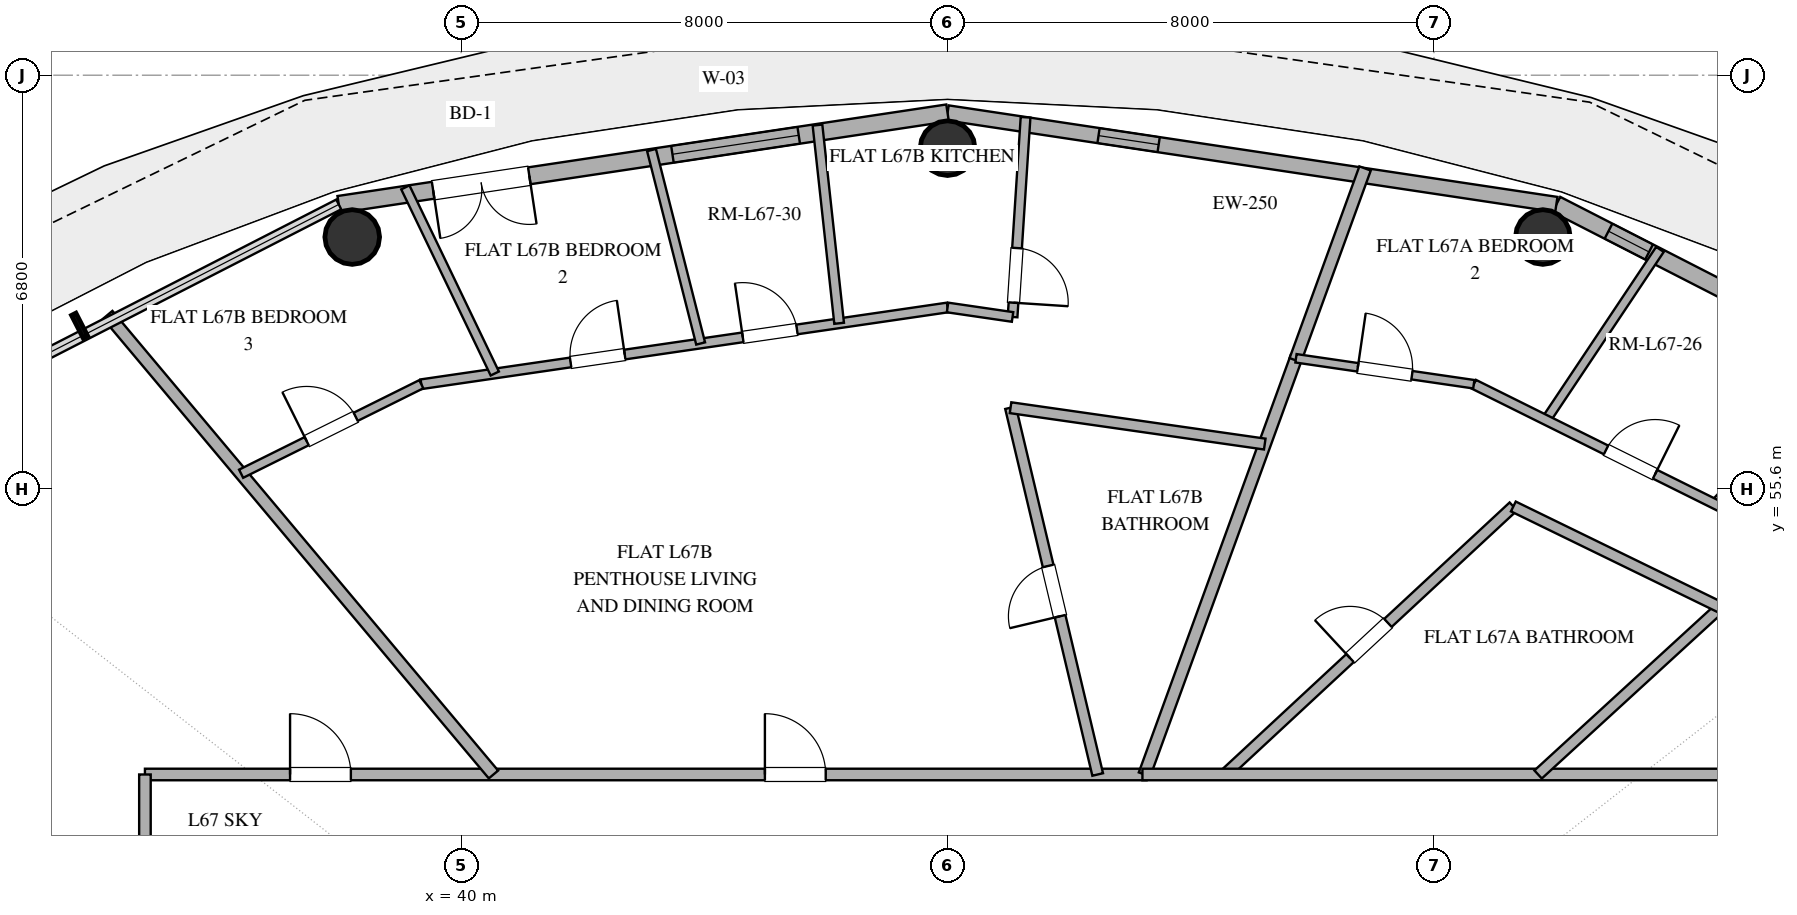
"""IFC4 building model, lengths in metres.
Left out: names, types, materials, properties, quantities, classifications, styles, units other than length and angle.
Written with IfcOpenShell. Run it as: python <this file> out.ifc"""

import sys

from ifc_helpers import new_model, si_unit, direction, frame, frame_2d, origin, origin_2d, place, context, subcontext, project, spatial, rectangle, hollow_circle, extrude, element, fill, save


model = new_model("IFC4")
c1 = context("Model", 3, precision=1e-05, world=origin(), true_north=direction((0.0, 1.0)))
c2 = subcontext(c1, "Body", "Model", "MODEL_VIEW")
j1 = project(units=[si_unit("LENGTHUNIT", "METRE"), si_unit("PLANEANGLEUNIT", "RADIAN")], contexts=[c1])
p1 = place(None, origin())
s1 = spatial("IfcSite", under=j1, at=p1, CompositionType="ELEMENT")
p2 = place(p1, origin())
s2 = spatial("IfcBuilding", under=s1, at=p2, CompositionType="ELEMENT")
p3 = place(p2, frame((0.0, 0.0, 262.2)))
s3 = spatial("IfcBuildingStorey", under=s2, at=p3, CompositionType="ELEMENT", Elevation=262.2)
for number, where, z_axis, x_axis in (
    (1, (57.791, 59.739, 0.0), (0.0, 0.0, 1.0), (1.0, 0.0, 0.0)),
    (2, (48.0, 61.2, 0.0), (0.0, 0.0, 1.0), (1.0, 0.0, 0.0)),
    (3, (38.209, 59.739, 0.0), (0.0, 0.0, 1.0), (1.0, 0.0, 0.0)),
):
    element("IfcColumn", number, at=place(p3, frame(where, z_axis=z_axis, x_axis=x_axis)), inside=s3, PredefinedType="COLUMN", context=c2, shape_type="SweptSolid", body=[
        extrude(hollow_circle(Radius=0.45, WallThickness=0.025, at=origin_2d()), origin(), (0.0, 0.0, 1.0), 3.37),
    ])
p4 = place(p3, frame((66.383, 55.987, 0.0), z_axis=(0.0, 0.0, 1.0), x_axis=(-0.890007394051, 0.455946091699, 0.0)))
e4 = element("IfcWall", 4, at=p4, inside=s3, PredefinedType="SOLIDWALL", context=c2, shape_type="SweptSolid", body=[
    extrude(rectangle(XDim=9.404, YDim=0.28, at=frame_2d((4.702, 0.0))), origin(), (0.0, 0.0, 1.0), 3.37),
])
p5 = place(p4, frame((1.996, 0.0, 0.85)))
e5 = element("IfcOpeningElement", 5, at=p5, cuts=e4, PredefinedType="OPENING", context=c2, shape_type="SweptSolid", body=[
    extrude(rectangle(XDim=1.2, YDim=1.8, at=frame_2d((0.6, 0.9))), frame((0.0, 0.15, 0.0), z_axis=(0.0, -1.0, 0.0), x_axis=(1.0, 0.0, 0.0)), (0.0, 0.0, 1.0), 0.3),
])
p6 = place(p4, frame((5.109, 0.0, 0.85)))
e6 = element("IfcOpeningElement", 6, at=p6, cuts=e4, PredefinedType="OPENING", context=c2, shape_type="SweptSolid", body=[
    extrude(rectangle(XDim=1.2, YDim=1.6, at=frame_2d((0.6, 0.8))), frame((0.0, 0.15, 0.0), z_axis=(0.0, -1.0, 0.0), x_axis=(1.0, 0.0, 0.0)), (0.0, 0.0, 1.0), 0.3),
])
p7 = place(p4, frame((7.691, 0.0, 0.85)))
e7 = element("IfcOpeningElement", 7, at=p7, cuts=e4, PredefinedType="OPENING", context=c2, shape_type="SweptSolid", body=[
    extrude(rectangle(XDim=0.75, YDim=1.8, at=frame_2d((0.375, 0.9))), frame((0.0, 0.15, 0.0), z_axis=(0.0, -1.0, 0.0), x_axis=(1.0, 0.0, 0.0)), (0.0, 0.0, 1.0), 0.3),
])
p8 = place(p3, frame((58.013, 60.274, 0.0), z_axis=(0.0, 0.0, 1.0), x_axis=(-0.988882522213, 0.148698881169, 0.0)))
e8 = element("IfcWall", 8, at=p8, inside=s3, PredefinedType="SOLIDWALL", context=c2, shape_type="SweptSolid", body=[
    extrude(rectangle(XDim=10.125, YDim=0.25, at=frame_2d((5.062, 0.0))), origin(), (0.0, 0.0, 1.0), 3.37),
])
p9 = place(p8, frame((6.614, 0.0, 1.42)))
e9 = element("IfcOpeningElement", 9, at=p9, cuts=e8, PredefinedType="OPENING", context=c2, shape_type="SweptSolid", body=[
    extrude(rectangle(XDim=1.0, YDim=1.05, at=frame_2d((0.5, 0.525))), frame((0.0, 0.135, 0.0), z_axis=(0.0, -1.0, 0.0), x_axis=(1.0, 0.0, 0.0)), (0.0, 0.0, 1.0), 0.27),
])
p10 = place(p3, frame((48.0, 61.78, 0.0), z_axis=(0.0, 0.0, 1.0), x_axis=(-0.988882522213, -0.148698881169, 0.0)))
e10 = element("IfcWall", 10, at=p10, inside=s3, PredefinedType="SOLIDWALL", context=c2, shape_type="SweptSolid", body=[
    extrude(rectangle(XDim=10.125, YDim=0.28, at=frame_2d((5.062, 0.0))), origin(), (0.0, 0.0, 1.0), 3.37),
])
p11 = place(p10, frame((2.475, 0.0, 0.85)))
e11 = element("IfcOpeningElement", 11, at=p11, cuts=e10, PredefinedType="OPENING", context=c2, shape_type="SweptSolid", body=[
    extrude(rectangle(XDim=2.1, YDim=2.2, at=frame_2d((1.05, 1.1))), frame((0.0, 0.15, 0.0), z_axis=(0.0, -1.0, 0.0), x_axis=(1.0, 0.0, 0.0)), (0.0, 0.0, 1.0), 0.3),
])
p12 = place(p10, frame((6.956, 0.0, 0.0)))
e12 = element("IfcOpeningElement", 12, at=p12, cuts=e10, PredefinedType="OPENING", context=c2, shape_type="SweptSolid", body=[
    extrude(rectangle(XDim=1.6, YDim=2.25, at=frame_2d((0.8, 1.125))), frame((0.0, 0.15, 0.0), z_axis=(0.0, -1.0, 0.0), x_axis=(1.0, 0.0, 0.0)), (0.0, 0.0, 1.0), 0.3),
])
p13 = place(p3, frame((34.8, 50.9, 0.0), z_axis=(0.0, 0.0, 1.0), x_axis=(1.0, 0.0, 0.0)))
e13 = element("IfcWall", 13, at=p13, inside=s3, PredefinedType="PARTITIONING", context=c2, shape_type="SweptSolid", body=[
    extrude(rectangle(XDim=16.473, YDim=0.19, at=frame_2d((8.237, 0.0))), origin(), (0.0, 0.0, 1.0), 2.73),
])
p14 = place(p13, frame((10.196, 0.0, 0.0)))
e14 = element("IfcOpeningElement", 14, at=p14, cuts=e13, PredefinedType="OPENING", context=c2, shape_type="SweptSolid", body=[
    extrude(rectangle(XDim=1.0, YDim=2.2, at=frame_2d((0.5, 1.1))), frame((0.0, 0.105, 0.0), z_axis=(0.0, -1.0, 0.0), x_axis=(1.0, 0.0, 0.0)), (0.0, 0.0, 1.0), 0.21),
])
p15 = place(p13, frame((2.387, 0.0, 0.0)))
e15 = element("IfcOpeningElement", 15, at=p15, cuts=e13, PredefinedType="OPENING", context=c2, shape_type="SweptSolid", body=[
    extrude(rectangle(XDim=1.0, YDim=2.2, at=frame_2d((0.5, 1.1))), frame((0.0, 0.105, 0.0), z_axis=(0.0, -1.0, 0.0), x_axis=(1.0, 0.0, 0.0)), (0.0, 0.0, 1.0), 0.21),
])
p16 = place(p3, frame((52.558, 50.9, 0.0), z_axis=(0.0, 0.0, 1.0), x_axis=(0.732849863846, 0.68039038578, 0.0)))
e16 = element("IfcWall", 16, at=p16, inside=s3, PredefinedType="PLUMBINGWALL", context=c2, shape_type="SweptSolid", body=[
    extrude(rectangle(XDim=6.478, YDim=0.18, at=frame_2d((3.239, 0.0))), origin(), (0.0, 0.0, 1.0), 2.73),
])
p17 = place(p16, frame((2.814, 0.0, 0.0)))
e17 = element("IfcOpeningElement", 17, at=p17, cuts=e16, PredefinedType="OPENING", context=c2, shape_type="SweptSolid", body=[
    extrude(rectangle(XDim=0.85, YDim=2.1, at=frame_2d((0.425, 1.05))), frame((0.0, 0.1, 0.0), z_axis=(0.0, -1.0, 0.0), x_axis=(1.0, 0.0, 0.0)), (0.0, 0.0, 1.0), 0.2),
])
p18 = place(p3, frame((40.532, 50.9, 0.0), z_axis=(0.0, 0.0, 1.0), x_axis=(-0.642777155779, 0.766053214868, 0.0)))
e18 = element("IfcWall", 18, at=p18, inside=s3, PredefinedType="PARTITIONING", context=c2, shape_type="SweptSolid", body=[
    extrude(rectangle(XDim=9.868, YDim=0.2, at=frame_2d((4.934, 0.0))), origin(), (0.0, 0.0, 1.0), 2.73),
])
p19 = place(p3, frame((50.469, 50.9, 0.0), z_axis=(0.0, 0.0, 1.0), x_axis=(-0.231121823084, 0.972924818727, 0.0)))
e19 = element("IfcWall", 19, at=p19, inside=s3, PredefinedType="PLUMBINGWALL", context=c2, shape_type="SweptSolid", body=[
    extrude(rectangle(XDim=6.2, YDim=0.18, at=frame_2d((3.1, 0.0))), origin(), (0.0, 0.0, 1.0), 2.73),
])
p20 = place(p19, frame((2.675, 0.0, 0.0)))
e20 = element("IfcOpeningElement", 20, at=p20, cuts=e19, PredefinedType="OPENING", context=c2, shape_type="SweptSolid", body=[
    extrude(rectangle(XDim=0.85, YDim=2.1, at=frame_2d((0.425, 1.05))), frame((0.0, 0.1, 0.0), z_axis=(0.0, -1.0, 0.0), x_axis=(1.0, 0.0, 0.0)), (0.0, 0.0, 1.0), 0.2),
])
p21 = place(p3, frame((51.239, 50.9, 0.0), z_axis=(0.0, 0.0, 1.0), x_axis=(0.342027045015, 0.939690108748, 0.0)))
e21 = element("IfcWall", 21, at=p21, inside=s3, PredefinedType="PARTITIONING", context=c2, shape_type="SweptSolid", body=[
    extrude(rectangle(XDim=7.316, YDim=0.2, at=frame_2d((3.658, 0.0))), origin(), (0.0, 0.0, 1.0), 2.73),
])
p22 = place(p3, frame((51.205, 50.9, 0.0), z_axis=(0.0, 0.0, 1.0), x_axis=(1.0, 0.0, 0.0)))
e22 = element("IfcWall", 22, at=p22, inside=s3, PredefinedType="PARTITIONING", context=c2, shape_type="SweptSolid", body=[
    extrude(rectangle(XDim=9.995, YDim=0.19, at=frame_2d((4.998, 0.0))), origin(), (0.0, 0.0, 1.0), 2.73),
])
p23 = place(p3, frame((34.8, 46.128, 0.0), z_axis=(0.0, 0.0, 1.0), x_axis=(0.0, 1.0, 0.0)))
e23 = element("IfcWall", 23, at=p23, inside=s3, PredefinedType="PARTITIONING", context=c2, shape_type="SweptSolid", body=[
    extrude(rectangle(XDim=4.771, YDim=0.19, at=frame_2d((2.386, 0.0))), origin(), (0.0, 0.0, 1.0), 2.73),
])
p24 = place(p3, frame((49.036, 56.932, 0.0), z_axis=(0.0, 0.0, 1.0), x_axis=(0.989927514161, -0.141575127434, 0.0)))
e24 = element("IfcWall", 24, at=p24, inside=s3, PredefinedType="PLUMBINGWALL", context=c2, shape_type="SweptSolid", body=[
    extrude(rectangle(XDim=4.223, YDim=0.18, at=frame_2d((2.112, 0.0))), origin(), (0.0, 0.0, 1.0), 2.73),
])
p25 = place(p3, frame((60.711, 53.648, 0.0), z_axis=(0.0, 0.0, 1.0), x_axis=(-0.737258783223, -0.675610454745, 0.0)))
e25 = element("IfcWall", 25, at=p25, inside=s3, PredefinedType="PLUMBINGWALL", context=c2, shape_type="SweptSolid", body=[
    extrude(rectangle(XDim=4.067, YDim=0.18, at=frame_2d((2.034, 0.0))), origin(), (0.0, 0.0, 1.0), 2.73),
])
p26 = place(p3, frame((57.305, 55.308, 0.0), z_axis=(0.0, 0.0, 1.0), x_axis=(0.898917645735, -0.438117639667, 0.0)))
e26 = element("IfcWall", 26, at=p26, inside=s3, PredefinedType="PLUMBINGWALL", context=c2, shape_type="SweptSolid", body=[
    extrude(rectangle(XDim=3.789, YDim=0.18, at=frame_2d((1.895, 0.0))), origin(), (0.0, 0.0, 1.0), 2.73),
])
p27 = place(p3, frame((39.345, 57.318, 0.0), z_axis=(0.0, 0.0, 1.0), x_axis=(0.989536136377, 0.144285254977, 0.0)))
e27 = element("IfcWall", 27, at=p27, inside=s3, PredefinedType="PLUMBINGWALL", context=c2, shape_type="SweptSolid", body=[
    extrude(rectangle(XDim=8.746, YDim=0.16, at=frame_2d((4.373, 0.0))), origin(), (0.0, 0.0, 1.0), 2.73),
])
p28 = place(p27, frame((2.481, 0.0, 0.0)))
e28 = element("IfcOpeningElement", 28, at=p28, cuts=e27, PredefinedType="OPENING", context=c2, shape_type="SweptSolid", body=[
    extrude(rectangle(XDim=0.9, YDim=2.1, at=frame_2d((0.45, 1.05))), frame((0.0, 0.09, 0.0), z_axis=(0.0, -1.0, 0.0), x_axis=(1.0, 0.0, 0.0)), (0.0, 0.0, 1.0), 0.18),
])
p29 = place(p27, frame((5.344, 0.0, 0.0)))
e29 = element("IfcOpeningElement", 29, at=p29, cuts=e27, PredefinedType="OPENING", context=c2, shape_type="SweptSolid", body=[
    extrude(rectangle(XDim=0.9, YDim=2.1, at=frame_2d((0.45, 1.05))), frame((0.0, 0.09, 0.0), z_axis=(0.0, -1.0, 0.0), x_axis=(1.0, 0.0, 0.0)), (0.0, 0.0, 1.0), 0.18),
])
p30 = place(p3, frame((60.623, 55.347, 0.0), z_axis=(0.0, 0.0, 1.0), x_axis=(0.687190766796, 0.726477012734, 0.0)))
e30 = element("IfcWall", 30, at=p30, inside=s3, PredefinedType="PLUMBINGWALL", context=c2, shape_type="SweptSolid", body=[
    extrude(rectangle(XDim=3.449, YDim=0.16, at=frame_2d((1.725, 0.0))), origin(), (0.0, 0.0, 1.0), 2.73),
])
p31 = place(p3, frame((40.554, 57.494, 0.0), z_axis=(0.0, 0.0, 1.0), x_axis=(-0.433125990105, 0.901333388206, 0.0)))
e31 = element("IfcWall", 31, at=p31, inside=s3, PredefinedType="PARTITIONING", context=c2, shape_type="SweptSolid", body=[
    extrude(rectangle(XDim=3.396, YDim=0.15, at=frame_2d((1.698, 0.0))), origin(), (0.0, 0.0, 1.0), 2.73),
])
p32 = place(p3, frame((59.717, 59.535, 0.0), z_axis=(0.0, 0.0, 1.0), x_axis=(-0.555567743092, -0.831471276013, 0.0)))
e32 = element("IfcWall", 32, at=p32, inside=s3, PredefinedType="PARTITIONING", context=c2, shape_type="SweptSolid", body=[
    extrude(rectangle(XDim=3.376, YDim=0.15, at=frame_2d((1.688, 0.0))), origin(), (0.0, 0.0, 1.0), 2.73),
])
p33 = place(p3, frame((54.867, 60.866, 0.0), z_axis=(0.0, 0.0, 1.0), x_axis=(-0.342000121366, -0.939699907942, 0.0)))
e33 = element("IfcWall", 33, at=p33, inside=s3, PredefinedType="PARTITIONING", context=c2, shape_type="SweptSolid", body=[
    extrude(rectangle(XDim=3.355, YDim=0.2, at=frame_2d((1.678, 0.0))), origin(), (0.0, 0.0, 1.0), 2.73),
])
p34 = place(p3, frame((36.382, 55.846, 0.0), z_axis=(0.0, 0.0, 1.0), x_axis=(0.895604637563, 0.444850911177, 0.0)))
e34 = element("IfcWall", 34, at=p34, inside=s3, PredefinedType="PARTITIONING", context=c2, shape_type="SweptSolid", body=[
    extrude(rectangle(XDim=3.309, YDim=0.15, at=frame_2d((1.654, 0.0))), origin(), (0.0, 0.0, 1.0), 2.73),
])
p35 = place(p34, frame((1.204, 0.0, 0.0)))
e35 = element("IfcOpeningElement", 35, at=p35, cuts=e34, PredefinedType="OPENING", context=c2, shape_type="SweptSolid", body=[
    extrude(rectangle(XDim=0.9, YDim=2.1, at=frame_2d((0.45, 1.05))), frame((0.0, 0.085, 0.0), z_axis=(0.0, -1.0, 0.0), x_axis=(1.0, 0.0, 0.0)), (0.0, 0.0, 1.0), 0.17),
])
p36 = place(p3, frame((49.283, 61.708, 0.0), z_axis=(0.0, 0.0, 1.0), x_axis=(-0.064987599341, -0.997886071619, 0.0)))
e36 = element("IfcWall", 36, at=p36, inside=s3, PredefinedType="PLUMBINGWALL", context=c2, shape_type="SweptSolid", body=[
    extrude(rectangle(XDim=3.291, YDim=0.16, at=frame_2d((1.646, 0.0))), origin(), (0.0, 0.0, 1.0), 2.73),
])
p37 = place(p36, frame((2.156, 0.0, 0.0)))
e37 = element("IfcOpeningElement", 37, at=p37, cuts=e36, PredefinedType="OPENING", context=c2, shape_type="SweptSolid", body=[
    extrude(rectangle(XDim=0.9, YDim=2.1, at=frame_2d((0.45, 1.05))), frame((0.0, 0.09, 0.0), z_axis=(0.0, -1.0, 0.0), x_axis=(1.0, 0.0, 0.0)), (0.0, 0.0, 1.0), 0.18),
])
p38 = place(p3, frame((43.132, 61.169, 0.0), z_axis=(0.0, 0.0, 1.0), x_axis=(0.246087289335, -0.969247670117, 0.0)))
e38 = element("IfcWall", 38, at=p38, inside=s3, PredefinedType="PARTITIONING", context=c2, shape_type="SweptSolid", body=[
    extrude(rectangle(XDim=3.282, YDim=0.15, at=frame_2d((1.641, 0.0))), origin(), (0.0, 0.0, 1.0), 2.73),
])
p39 = place(p3, frame((46.217, 58.32, 0.0), z_axis=(0.0, 0.0, 1.0), x_axis=(-0.108559889868, 0.994089910577, 0.0)))
e39 = element("IfcWall", 39, at=p39, inside=s3, PredefinedType="PLUMBINGWALL", context=c2, shape_type="SweptSolid", body=[
    extrude(rectangle(XDim=3.279, YDim=0.16, at=frame_2d((1.639, 0.0))), origin(), (0.0, 0.0, 1.0), 2.73),
])
p40 = place(p3, frame((56.655, 57.318, 0.0), z_axis=(0.0, 0.0, 1.0), x_axis=(0.89555447129, -0.444951895099, 0.0)))
e40 = element("IfcWall", 40, at=p40, inside=s3, PredefinedType="PLUMBINGWALL", context=c2, shape_type="SweptSolid", body=[
    extrude(rectangle(XDim=6.222, YDim=0.16, at=frame_2d((3.111, 0.0))), origin(), (0.0, 0.0, 1.0), 2.73),
])
p41 = place(p40, frame((2.428, 0.0, 0.0)))
e41 = element("IfcOpeningElement", 41, at=p41, cuts=e40, PredefinedType="OPENING", context=c2, shape_type="SweptSolid", body=[
    extrude(rectangle(XDim=0.9, YDim=2.1, at=frame_2d((0.45, 1.05))), frame((0.0, 0.09, 0.0), z_axis=(0.0, -1.0, 0.0), x_axis=(1.0, 0.0, 0.0)), (0.0, 0.0, 1.0), 0.18),
])
p42 = place(p3, frame((53.73, 57.744, 0.0), z_axis=(0.0, 0.0, 1.0), x_axis=(0.989530523264, -0.144323745545, 0.0)))
e42 = element("IfcWall", 42, at=p42, inside=s3, PredefinedType="PARTITIONING", context=c2, shape_type="SweptSolid", body=[
    extrude(rectangle(XDim=2.955, YDim=0.14, at=frame_2d((1.478, 0.0))), origin(), (0.0, 0.0, 1.0), 2.73),
])
p43 = place(p42, frame((1.028, 0.0, 0.0)))
e43 = element("IfcOpeningElement", 43, at=p43, cuts=e42, PredefinedType="OPENING", context=c2, shape_type="SweptSolid", body=[
    extrude(rectangle(XDim=0.9, YDim=2.1, at=frame_2d((0.45, 1.05))), frame((0.0, 0.08, 0.0), z_axis=(0.0, -1.0, 0.0), x_axis=(1.0, 0.0, 0.0)), (0.0, 0.0, 1.0), 0.16),
])
p44 = place(p3, frame((49.069, 58.424, 0.0), z_axis=(0.0, 0.0, 1.0), x_axis=(-0.989520204584, 0.144394476074, 0.0)))
e44 = element("IfcWall", 44, at=p44, inside=s3, PredefinedType="PLUMBINGWALL", context=c2, shape_type="SweptSolid", body=[
    extrude(rectangle(XDim=1.08, YDim=0.16, at=frame_2d((0.54, 0.0))), origin(), (0.0, 0.0, 1.0), 2.73),
])
p45 = place(p11, origin())
e45 = element("IfcWindow", 45, at=p45, inside=s3, PartitioningType="SINGLE_PANEL", PredefinedType="WINDOW", context=c2, shape_type="SweptSolid", body=[
    extrude(rectangle(XDim=2.1, YDim=2.2, at=frame_2d((1.05, 1.1))), frame((0.0, 0.03, 0.0), z_axis=(0.0, -1.0, 0.0), x_axis=(1.0, 0.0, 0.0)), (0.0, 0.0, 1.0), 0.06),
])
fill(e11, e45)
p46 = place(p12, origin())
e46 = element("IfcDoor", 46, at=p46, inside=s3, OperationType="DOUBLE_DOOR_SINGLE_SWING", PredefinedType="DOOR", context=c2, shape_type="SweptSolid", body=[
    extrude(rectangle(XDim=1.6, YDim=2.25, at=frame_2d((0.8, 1.125))), frame((0.0, 0.025, 0.0), z_axis=(0.0, -1.0, 0.0), x_axis=(1.0, 0.0, 0.0)), (0.0, 0.0, 1.0), 0.05),
])
fill(e12, e46)
p47 = place(p7, origin())
e47 = element("IfcWindow", 47, at=p47, inside=s3, PartitioningType="SINGLE_PANEL", PredefinedType="WINDOW", context=c2, shape_type="SweptSolid", body=[
    extrude(rectangle(XDim=0.75, YDim=1.8, at=frame_2d((0.375, 0.9))), frame((0.0, 0.03, 0.0), z_axis=(0.0, -1.0, 0.0), x_axis=(1.0, 0.0, 0.0)), (0.0, 0.0, 1.0), 0.06),
])
fill(e7, e47)
p48 = place(p9, origin())
e48 = element("IfcWindow", 48, at=p48, inside=s3, PartitioningType="SINGLE_PANEL", PredefinedType="WINDOW", context=c2, shape_type="SweptSolid", body=[
    extrude(rectangle(XDim=1.0, YDim=1.05, at=frame_2d((0.5, 0.525))), frame((0.0, 0.03, 0.0), z_axis=(0.0, -1.0, 0.0), x_axis=(1.0, 0.0, 0.0)), (0.0, 0.0, 1.0), 0.06),
])
fill(e9, e48)
p49 = place(p14, origin())
e49 = element("IfcDoor", 49, at=p49, inside=s3, OperationType="SINGLE_SWING_LEFT", PredefinedType="DOOR", context=c2, shape_type="SweptSolid", body=[
    extrude(rectangle(XDim=1.0, YDim=2.2, at=frame_2d((0.5, 1.1))), frame((0.0, 0.025, 0.0), z_axis=(0.0, -1.0, 0.0), x_axis=(1.0, 0.0, 0.0)), (0.0, 0.0, 1.0), 0.05),
])
fill(e14, e49)
p50 = place(p15, origin())
e50 = element("IfcDoor", 50, at=p50, inside=s3, OperationType="SINGLE_SWING_LEFT", PredefinedType="DOOR", context=c2, shape_type="SweptSolid", body=[
    extrude(rectangle(XDim=1.0, YDim=2.2, at=frame_2d((0.5, 1.1))), frame((0.0, 0.025, 0.0), z_axis=(0.0, -1.0, 0.0), x_axis=(1.0, 0.0, 0.0)), (0.0, 0.0, 1.0), 0.05),
])
fill(e15, e50)
p51 = place(p17, origin())
e51 = element("IfcDoor", 51, at=p51, inside=s3, OperationType="SINGLE_SWING_LEFT", PredefinedType="DOOR", context=c2, shape_type="SweptSolid", body=[
    extrude(rectangle(XDim=0.85, YDim=2.1, at=frame_2d((0.425, 1.05))), frame((0.0, 0.025, 0.0), z_axis=(0.0, -1.0, 0.0), x_axis=(1.0, 0.0, 0.0)), (0.0, 0.0, 1.0), 0.05),
])
fill(e17, e51)
p52 = place(p20, origin())
e52 = element("IfcDoor", 52, at=p52, inside=s3, OperationType="SINGLE_SWING_LEFT", PredefinedType="DOOR", context=c2, shape_type="SweptSolid", body=[
    extrude(rectangle(XDim=0.85, YDim=2.1, at=frame_2d((0.425, 1.05))), frame((0.0, 0.025, 0.0), z_axis=(0.0, -1.0, 0.0), x_axis=(1.0, 0.0, 0.0)), (0.0, 0.0, 1.0), 0.05),
])
fill(e20, e52)
p53 = place(p28, origin())
e53 = element("IfcDoor", 53, at=p53, inside=s3, OperationType="SINGLE_SWING_RIGHT", PredefinedType="DOOR", context=c2, shape_type="SweptSolid", body=[
    extrude(rectangle(XDim=0.9, YDim=2.1, at=frame_2d((0.45, 1.05))), frame((0.0, 0.025, 0.0), z_axis=(0.0, -1.0, 0.0), x_axis=(1.0, 0.0, 0.0)), (0.0, 0.0, 1.0), 0.05),
])
fill(e28, e53)
p54 = place(p29, origin())
e54 = element("IfcDoor", 54, at=p54, inside=s3, OperationType="SINGLE_SWING_LEFT", PredefinedType="DOOR", context=c2, shape_type="SweptSolid", body=[
    extrude(rectangle(XDim=0.9, YDim=2.1, at=frame_2d((0.45, 1.05))), frame((0.0, 0.025, 0.0), z_axis=(0.0, -1.0, 0.0), x_axis=(1.0, 0.0, 0.0)), (0.0, 0.0, 1.0), 0.05),
])
fill(e29, e54)
p55 = place(p35, origin())
e55 = element("IfcDoor", 55, at=p55, inside=s3, OperationType="SINGLE_SWING_LEFT", PredefinedType="DOOR", context=c2, shape_type="SweptSolid", body=[
    extrude(rectangle(XDim=0.9, YDim=2.1, at=frame_2d((0.45, 1.05))), frame((0.0, 0.025, 0.0), z_axis=(0.0, -1.0, 0.0), x_axis=(1.0, 0.0, 0.0)), (0.0, 0.0, 1.0), 0.05),
])
fill(e35, e55)
p56 = place(p37, origin())
e56 = element("IfcDoor", 56, at=p56, inside=s3, OperationType="SINGLE_SWING_RIGHT", PredefinedType="DOOR", context=c2, shape_type="SweptSolid", body=[
    extrude(rectangle(XDim=0.9, YDim=2.1, at=frame_2d((0.45, 1.05))), frame((0.0, 0.025, 0.0), z_axis=(0.0, -1.0, 0.0), x_axis=(1.0, 0.0, 0.0)), (0.0, 0.0, 1.0), 0.05),
])
fill(e37, e56)
p57 = place(p41, origin())
e57 = element("IfcDoor", 57, at=p57, inside=s3, OperationType="SINGLE_SWING_RIGHT", PredefinedType="DOOR", context=c2, shape_type="SweptSolid", body=[
    extrude(rectangle(XDim=0.9, YDim=2.1, at=frame_2d((0.45, 1.05))), frame((0.0, 0.025, 0.0), z_axis=(0.0, -1.0, 0.0), x_axis=(1.0, 0.0, 0.0)), (0.0, 0.0, 1.0), 0.05),
])
fill(e41, e57)
p58 = place(p43, origin())
e58 = element("IfcDoor", 58, at=p58, inside=s3, OperationType="SINGLE_SWING_LEFT", PredefinedType="DOOR", context=c2, shape_type="SweptSolid", body=[
    extrude(rectangle(XDim=0.9, YDim=2.1, at=frame_2d((0.45, 1.05))), frame((0.0, 0.025, 0.0), z_axis=(0.0, -1.0, 0.0), x_axis=(1.0, 0.0, 0.0)), (0.0, 0.0, 1.0), 0.05),
])
fill(e43, e58)
save(model, sys.argv[1])
